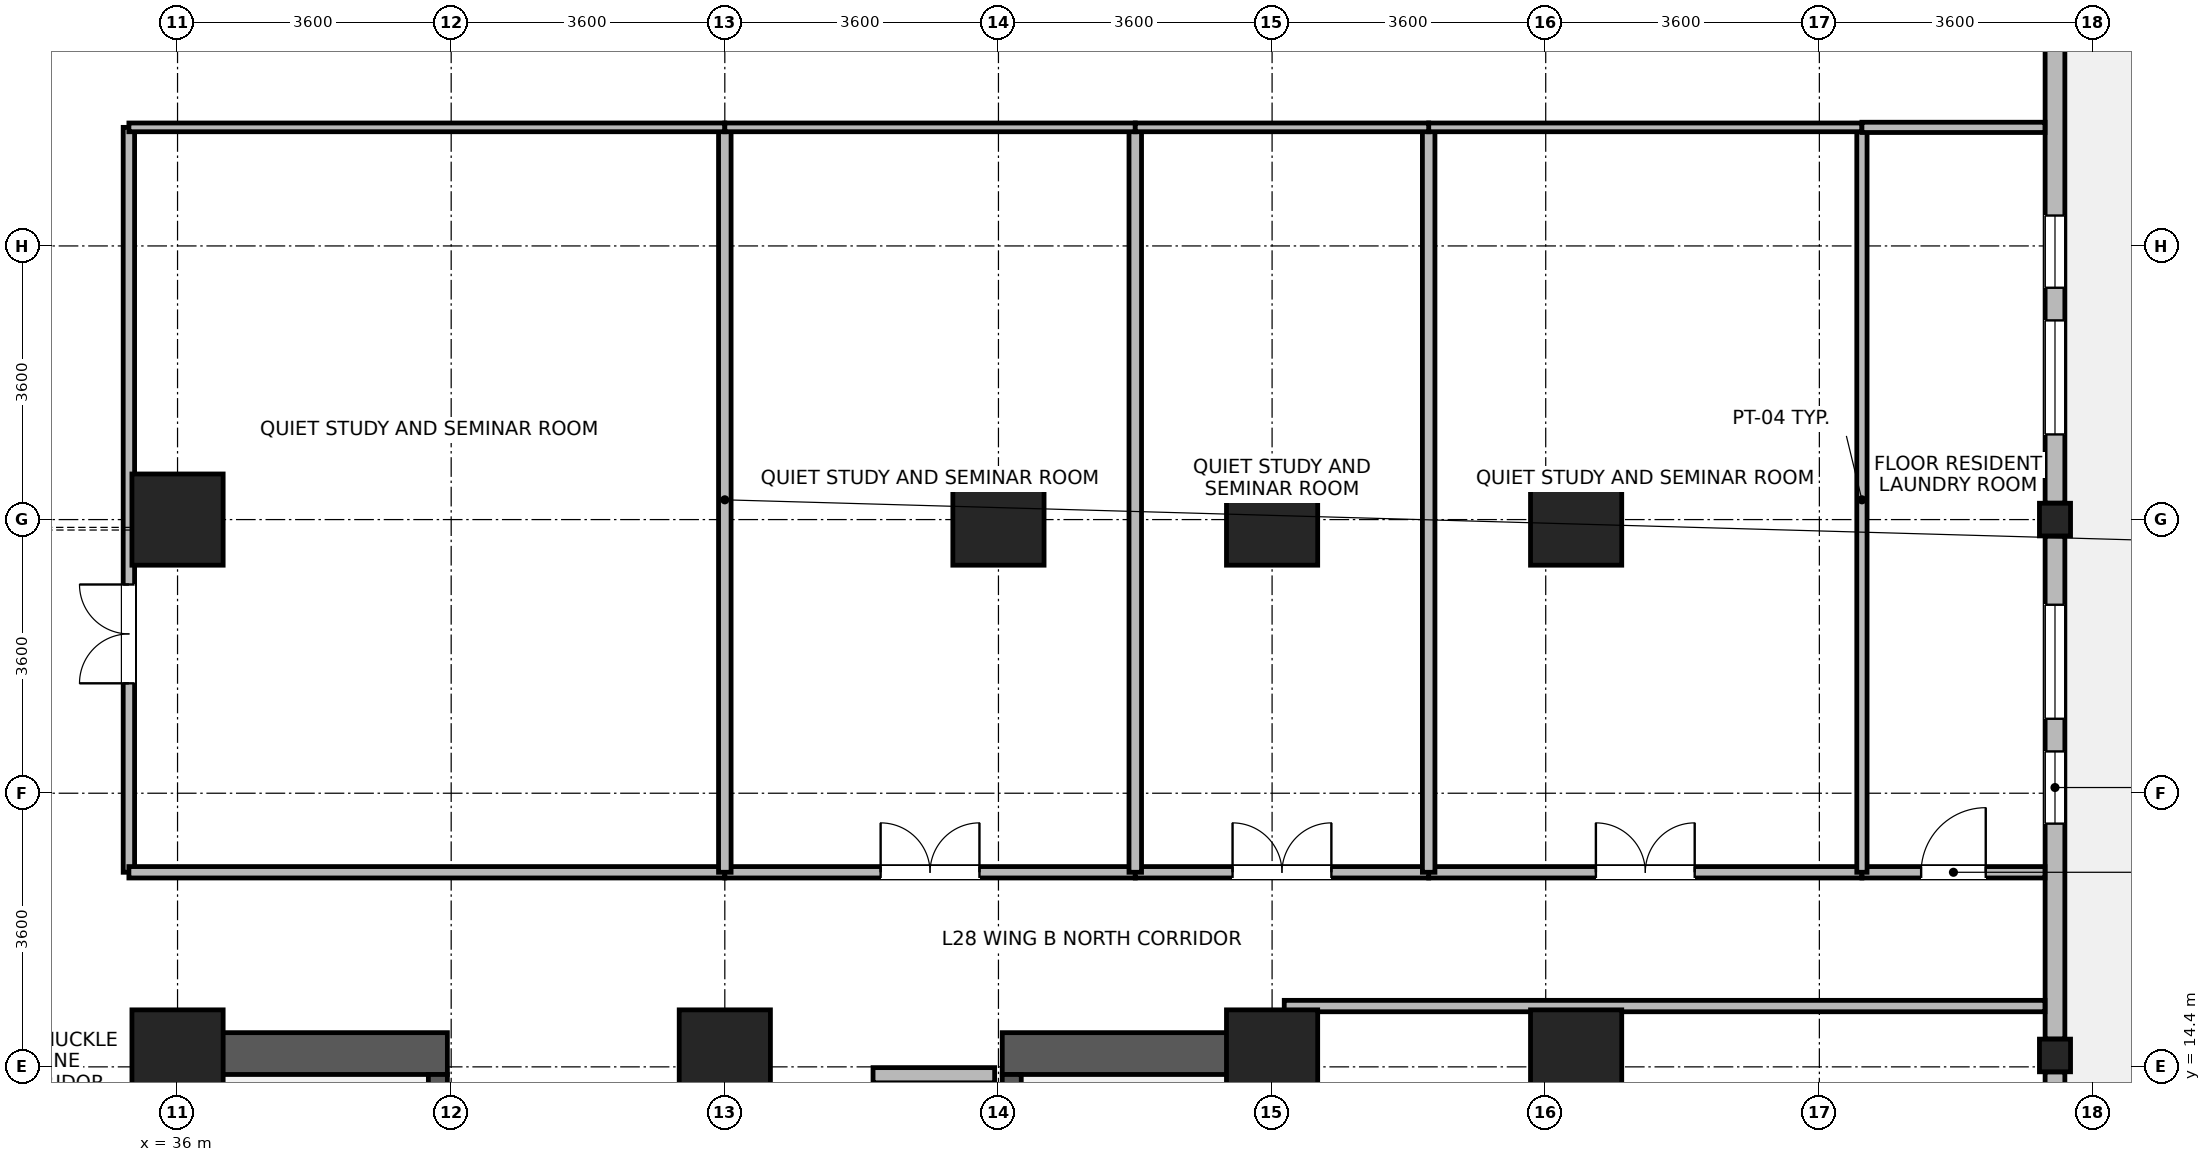
"""IFC4 building model, lengths in metres.
Left out: names, types, materials, properties, quantities, classifications, styles, units other than length and angle.
Written with IfcOpenShell. Run it as: python <this file> out.ifc"""

import sys

from ifc_helpers import new_model, si_unit, direction, frame, frame_2d, origin, origin_2d, place, context, subcontext, project, spatial, rectangle, i_section, extrude, source, transform, mapped, element, fill, save


model = new_model("IFC4")
c1 = context("Model", 3, precision=1e-05, world=origin(), true_north=direction((0.0, 1.0)))
c2 = subcontext(c1, "Body", "Model", "MODEL_VIEW")
j1 = project(units=[si_unit("LENGTHUNIT", "METRE"), si_unit("PLANEANGLEUNIT", "RADIAN")], contexts=[c1])
p1 = place(None, origin())
s1 = spatial("IfcSite", under=j1, at=p1, CompositionType="ELEMENT")
p2 = place(p1, origin())
s2 = spatial("IfcBuilding", under=s1, at=p2, CompositionType="ELEMENT")
p3 = place(p2, frame((0.0, 0.0, 111.9)))
s3 = spatial("IfcBuildingStorey", under=s2, at=p3, CompositionType="ELEMENT", Elevation=111.9)
for number, where, z_axis, x_axis in (
    (1, (36.075, 6.75, 0.0), (0.0, 0.0, 1.0), (0.0, 1.0, 0.0)),
    (2, (50.325, 6.75, 0.0), (0.0, 0.0, 1.0), (0.0, 1.0, 0.0)),
):
    element("IfcWall", number, at=place(p3, frame(where, z_axis=z_axis, x_axis=x_axis)), inside=s3, PredefinedType="SHEAR", context=c2, shape_type="SweptSolid", body=[
        extrude(rectangle(XDim=8.1, YDim=0.55, at=frame_2d((4.05, 0.0))), origin(), (0.0, 0.0, 1.0), 3.45),
    ])
for number, where, z_axis, x_axis in (
    (3, (36.35, 14.575, 0.0), (0.0, 0.0, 1.0), (1.0, 0.0, 0.0)),
    (4, (46.85, 14.575, 0.0), (0.0, 0.0, 1.0), (1.0, 0.0, 0.0)),
):
    element("IfcWall", number, at=place(p3, frame(where, z_axis=z_axis, x_axis=x_axis)), inside=s3, PredefinedType="SHEAR", context=c2, shape_type="SweptSolid", body=[
        extrude(rectangle(XDim=3.2, YDim=0.55, at=frame_2d((1.6, 0.0))), origin(), (0.0, 0.0, 1.0), 3.45),
    ])
p4 = place(p3, frame((39.425, 7.3, 0.0), z_axis=(0.0, 0.0, 1.0), x_axis=(0.0, 1.0, 0.0)))
e5 = element("IfcWall", 5, at=p4, inside=s3, PredefinedType="SHEAR", context=c2, shape_type="SweptSolid", body=[
    extrude(rectangle(XDim=7.0, YDim=0.25, at=frame_2d((3.5, 0.0))), origin(), (0.0, 0.0, 1.0), 3.45),
])
p5 = place(p4, frame((0.15, 0.0, 0.0)))
e6 = element("IfcOpeningElement", 6, at=p5, cuts=e5, PredefinedType="OPENING", context=c2, shape_type="SweptSolid", body=[
    extrude(rectangle(XDim=1.1, YDim=2.08, at=frame_2d((0.55, 1.04))), frame((0.0, 0.135, 0.0), z_axis=(0.0, -1.0, 0.0), x_axis=(1.0, 0.0, 0.0)), (0.0, 0.0, 1.0), 0.27),
])
p6 = place(p3, frame((46.975, 7.3, 0.0), z_axis=(0.0, 0.0, 1.0), x_axis=(0.0, 1.0, 0.0)))
e7 = element("IfcWall", 7, at=p6, inside=s3, PredefinedType="SHEAR", context=c2, shape_type="SweptSolid", body=[
    extrude(rectangle(XDim=7.0, YDim=0.25, at=frame_2d((3.5, 0.0))), origin(), (0.0, 0.0, 1.0), 3.45),
])
p7 = place(p6, frame((0.15, 0.0, 0.0)))
e8 = element("IfcOpeningElement", 8, at=p7, cuts=e7, PredefinedType="OPENING", context=c2, shape_type="SweptSolid", body=[
    extrude(rectangle(XDim=1.1, YDim=2.08, at=frame_2d((0.55, 1.04))), frame((0.0, 0.135, 0.0), z_axis=(0.0, -1.0, 0.0), x_axis=(1.0, 0.0, 0.0)), (0.0, 0.0, 1.0), 0.27),
])
m1 = source(origin(), c2, "Body", "SweptSolid", [
    extrude(rectangle(XDim=1.2, YDim=1.2, at=origin_2d()), origin(), (0.0, 0.0, 1.0), 3.7),
])
for number, where, z_axis, x_axis in (
    (9, (36.0, 21.6, 0.0), (0.0, 0.0, 1.0), (1.0, 0.0, 0.0)),
    (10, (46.8, 21.6, 0.0), (0.0, 0.0, 1.0), (1.0, 0.0, 0.0)),
    (11, (36.0, 14.55, 0.0), (0.0, 0.0, 1.0), (1.0, 0.0, 0.0)),
    (12, (43.2, 14.55, 0.0), (0.0, 0.0, 1.0), (1.0, 0.0, 0.0)),
    (13, (50.4, 14.55, 0.0), (0.0, 0.0, 1.0), (1.0, 0.0, 0.0)),
    (14, (50.4, 21.6, 0.0), (0.0, 0.0, 1.0), (1.0, 0.0, 0.0)),
    (15, (54.4, 14.55, 0.0), (0.0, 0.0, 1.0), (1.0, 0.0, 0.0)),
    (16, (54.4, 21.6, 0.0), (0.0, 0.0, 1.0), (1.0, 0.0, 0.0)),
):
    element("IfcColumn", number, at=place(p3, frame(where, z_axis=z_axis, x_axis=x_axis)), inside=s3, PredefinedType="COLUMN", context=c2, shape_type="MappedRepresentation", body=[
        mapped(m1, transform((0.0, 0.0, 0.0), x_axis=(1.0, 0.0, 0.0), y_axis=(0.0, 1.0, 0.0), z_axis=(0.0, 0.0, 1.0), scale=1.0)),
    ])
m2 = source(origin(), c2, "Body", "SweptSolid", [
    extrude(i_section(OverallWidth=0.409, OverallDepth=0.43, WebThickness=0.024, FlangeThickness=0.033, FilletRadius=0.015, at=origin_2d()), origin(), (0.0, 0.0, 1.0), 3.7),
])
for number, where, z_axis, x_axis in (
    (17, (60.7, 14.55, 0.0), (0.0, 0.0, 1.0), (1.0, 0.0, 0.0)),
    (18, (60.7, 21.6, 0.0), (0.0, 0.0, 1.0), (1.0, 0.0, 0.0)),
):
    element("IfcColumn", number, at=place(p3, frame(where, z_axis=z_axis, x_axis=x_axis)), inside=s3, PredefinedType="COLUMN", context=c2, shape_type="MappedRepresentation", body=[
        mapped(m2, transform((0.0, 0.0, 0.0), x_axis=(1.0, 0.0, 0.0), y_axis=(0.0, 1.0, 0.0), z_axis=(0.0, 0.0, 1.0), scale=1.0)),
    ])
p8 = place(p3, frame((60.7, 14.334, 0.0), z_axis=(0.0, 0.0, 1.0), x_axis=(0.0, -1.0, 0.0)))
e19 = element("IfcWall", 19, at=p8, inside=s3, PredefinedType="STANDARD", context=c2, shape_type="SweptSolid", body=[
    extrude(rectangle(XDim=7.068, YDim=0.26, at=frame_2d((3.534, 0.0))), origin(), (0.0, 0.0, 1.0), 2.98),
])
p9 = place(p8, frame((2.784, 0.0, 0.0)))
e20 = element("IfcOpeningElement", 20, at=p9, cuts=e19, PredefinedType="OPENING", context=c2, shape_type="SweptSolid", body=[
    extrude(rectangle(XDim=1.5, YDim=2.15, at=frame_2d((0.75, 1.075))), frame((0.0, 0.14, 0.0), z_axis=(0.0, -1.0, 0.0), x_axis=(1.0, 0.0, 0.0)), (0.0, 0.0, 1.0), 0.28),
])
p10 = place(p8, frame((1.017, 0.0, 0.85)))
e21 = element("IfcOpeningElement", 21, at=p10, cuts=e19, PredefinedType="OPENING", context=c2, shape_type="SweptSolid", body=[
    extrude(rectangle(XDim=1.5, YDim=1.85, at=frame_2d((0.75, 0.925))), frame((0.0, 0.14, 0.0), z_axis=(0.0, -1.0, 0.0), x_axis=(1.0, 0.0, 0.0)), (0.0, 0.0, 1.0), 0.28),
])
p11 = place(p8, frame((4.551, 0.0, 0.85)))
e22 = element("IfcOpeningElement", 22, at=p11, cuts=e19, PredefinedType="OPENING", context=c2, shape_type="SweptSolid", body=[
    extrude(rectangle(XDim=1.5, YDim=1.85, at=frame_2d((0.75, 0.925))), frame((0.0, 0.14, 0.0), z_axis=(0.0, -1.0, 0.0), x_axis=(1.0, 0.0, 0.0)), (0.0, 0.0, 1.0), 0.28),
])
p12 = place(p3, frame((60.7, 21.384, 0.0), z_axis=(0.0, 0.0, 1.0), x_axis=(0.0, -1.0, 0.0)))
e23 = element("IfcWall", 23, at=p12, inside=s3, PredefinedType="STANDARD", context=c2, shape_type="SweptSolid", body=[
    extrude(rectangle(XDim=6.618, YDim=0.26, at=frame_2d((3.309, 0.0))), origin(), (0.0, 0.0, 1.0), 2.98),
])
p13 = place(p12, frame((0.905, 0.0, 0.85)))
e24 = element("IfcOpeningElement", 24, at=p13, cuts=e23, PredefinedType="OPENING", context=c2, shape_type="SweptSolid", body=[
    extrude(rectangle(XDim=1.5, YDim=1.85, at=frame_2d((0.75, 0.925))), frame((0.0, 0.14, 0.0), z_axis=(0.0, -1.0, 0.0), x_axis=(1.0, 0.0, 0.0)), (0.0, 0.0, 1.0), 0.28),
])
p14 = place(p12, frame((2.834, 0.0, 0.85)))
e25 = element("IfcOpeningElement", 25, at=p14, cuts=e23, PredefinedType="OPENING", context=c2, shape_type="SweptSolid", body=[
    extrude(rectangle(XDim=0.95, YDim=1.75, at=frame_2d((0.475, 0.875))), frame((0.0, 0.14, 0.0), z_axis=(0.0, -1.0, 0.0), x_axis=(1.0, 0.0, 0.0)), (0.0, 0.0, 1.0), 0.28),
])
p15 = place(p3, frame((60.7, 28.434, 0.0), z_axis=(0.0, 0.0, 1.0), x_axis=(0.0, -1.0, 0.0)))
e26 = element("IfcWall", 26, at=p15, inside=s3, PredefinedType="STANDARD", context=c2, shape_type="SweptSolid", body=[
    extrude(rectangle(XDim=6.618, YDim=0.26, at=frame_2d((3.309, 0.0))), origin(), (0.0, 0.0, 1.0), 2.98),
])
p16 = place(p15, frame((4.213, 0.0, 0.85)))
e27 = element("IfcOpeningElement", 27, at=p16, cuts=e26, PredefinedType="OPENING", context=c2, shape_type="SweptSolid", body=[
    extrude(rectangle(XDim=1.5, YDim=1.85, at=frame_2d((0.75, 0.925))), frame((0.0, 0.14, 0.0), z_axis=(0.0, -1.0, 0.0), x_axis=(1.0, 0.0, 0.0)), (0.0, 0.0, 1.0), 0.28),
])
p17 = place(p15, frame((2.834, 0.0, 0.85)))
e28 = element("IfcOpeningElement", 28, at=p17, cuts=e26, PredefinedType="OPENING", context=c2, shape_type="SweptSolid", body=[
    extrude(rectangle(XDim=0.95, YDim=1.75, at=frame_2d((0.475, 0.875))), frame((0.0, 0.14, 0.0), z_axis=(0.0, -1.0, 0.0), x_axis=(1.0, 0.0, 0.0)), (0.0, 0.0, 1.0), 0.28),
])
p18 = place(p3, frame((45.15, 14.29, 0.0), z_axis=(0.0, 0.0, 1.0), x_axis=(1.0, 0.0, 0.0)))
e29 = element("IfcWall", 29, at=p18, inside=s3, PredefinedType="PARTITIONING", context=c2, shape_type="SweptSolid", body=[
    extrude(rectangle(XDim=1.6, YDim=0.2, at=frame_2d((0.8, 0.0))), origin(), (0.0, 0.0, 1.0), 2.43),
])
p19 = place(p3, frame((50.56, 15.2, 0.0), z_axis=(0.0, 0.0, 1.0), x_axis=(1.0, 0.0, 0.0)))
e30 = element("IfcWall", 30, at=p19, inside=s3, PredefinedType="PARTITIONING", context=c2, shape_type="SweptSolid", body=[
    extrude(rectangle(XDim=10.008, YDim=0.15, at=frame_2d((5.004, 0.0))), origin(), (0.0, 0.0, 1.0), 3.43),
])
p20 = place(p3, frame((35.36, 16.96, 0.0), z_axis=(0.0, 0.0, 1.0), x_axis=(0.0, 1.0, 0.0)))
e31 = element("IfcWall", 31, at=p20, inside=s3, PredefinedType="PARTITIONING", context=c2, shape_type="SweptSolid", body=[
    extrude(rectangle(XDim=9.8, YDim=0.15, at=frame_2d((4.9, 0.0))), origin(), (0.0, 0.0, 1.0), 3.43),
])
p21 = place(p20, frame((2.486, 0.0, 0.0)))
e32 = element("IfcOpeningElement", 32, at=p21, cuts=e31, PredefinedType="OPENING", context=c2, shape_type="SweptSolid", body=[
    extrude(rectangle(XDim=1.3, YDim=2.12, at=frame_2d((0.65, 1.06))), frame((0.0, 0.085, 0.0), z_axis=(0.0, -1.0, 0.0), x_axis=(1.0, 0.0, 0.0)), (0.0, 0.0, 1.0), 0.17),
])
p22 = place(p3, frame((35.36, 16.96, 0.0), z_axis=(0.0, 0.0, 1.0), x_axis=(1.0, 0.0, 0.0)))
e33 = element("IfcWall", 33, at=p22, inside=s3, PredefinedType="PARTITIONING", context=c2, shape_type="SweptSolid", body=[
    extrude(rectangle(XDim=7.84, YDim=0.15, at=frame_2d((3.92, 0.0))), origin(), (0.0, 0.0, 1.0), 3.43),
])
p23 = place(p3, frame((52.46, 16.96, 0.0), z_axis=(0.0, 0.0, 1.0), x_axis=(1.0, 0.0, 0.0)))
e34 = element("IfcWall", 34, at=p23, inside=s3, PredefinedType="PARTITIONING", context=c2, shape_type="SweptSolid", body=[
    extrude(rectangle(XDim=5.7, YDim=0.15, at=frame_2d((2.85, 0.0))), origin(), (0.0, 0.0, 1.0), 3.43),
])
p24 = place(p23, frame((2.2, 0.0, 0.0)))
e35 = element("IfcOpeningElement", 35, at=p24, cuts=e34, PredefinedType="OPENING", context=c2, shape_type="SweptSolid", body=[
    extrude(rectangle(XDim=1.3, YDim=2.12, at=frame_2d((0.65, 1.06))), frame((0.0, 0.085, 0.0), z_axis=(0.0, -1.0, 0.0), x_axis=(1.0, 0.0, 0.0)), (0.0, 0.0, 1.0), 0.17),
])
p25 = place(p3, frame((43.2, 16.96, 0.0), z_axis=(0.0, 0.0, 1.0), x_axis=(1.0, 0.0, 0.0)))
e36 = element("IfcWall", 36, at=p25, inside=s3, PredefinedType="PARTITIONING", context=c2, shape_type="SweptSolid", body=[
    extrude(rectangle(XDim=5.4, YDim=0.15, at=frame_2d((2.7, 0.0))), origin(), (0.0, 0.0, 1.0), 3.43),
])
p26 = place(p25, frame((2.05, 0.0, 0.0)))
e37 = element("IfcOpeningElement", 37, at=p26, cuts=e36, PredefinedType="OPENING", context=c2, shape_type="SweptSolid", body=[
    extrude(rectangle(XDim=1.3, YDim=2.12, at=frame_2d((0.65, 1.06))), frame((0.0, 0.085, 0.0), z_axis=(0.0, -1.0, 0.0), x_axis=(1.0, 0.0, 0.0)), (0.0, 0.0, 1.0), 0.17),
])
p27 = place(p3, frame((48.6, 16.96, 0.0), z_axis=(0.0, 0.0, 1.0), x_axis=(1.0, 0.0, 0.0)))
e38 = element("IfcWall", 38, at=p27, inside=s3, PredefinedType="PARTITIONING", context=c2, shape_type="SweptSolid", body=[
    extrude(rectangle(XDim=3.86, YDim=0.15, at=frame_2d((1.93, 0.0))), origin(), (0.0, 0.0, 1.0), 3.43),
])
p28 = place(p27, frame((1.28, 0.0, 0.0)))
e39 = element("IfcOpeningElement", 39, at=p28, cuts=e38, PredefinedType="OPENING", context=c2, shape_type="SweptSolid", body=[
    extrude(rectangle(XDim=1.3, YDim=2.12, at=frame_2d((0.65, 1.06))), frame((0.0, 0.085, 0.0), z_axis=(0.0, -1.0, 0.0), x_axis=(1.0, 0.0, 0.0)), (0.0, 0.0, 1.0), 0.17),
])
p29 = place(p3, frame((58.16, 16.96, 0.0), z_axis=(0.0, 0.0, 1.0), x_axis=(1.0, 0.0, 0.0)))
e40 = element("IfcWall", 40, at=p29, inside=s3, PredefinedType="PARTITIONING", context=c2, shape_type="SweptSolid", body=[
    extrude(rectangle(XDim=2.408, YDim=0.15, at=frame_2d((1.204, 0.0))), origin(), (0.0, 0.0, 1.0), 3.43),
])
p30 = place(p29, frame((0.779, 0.0, 0.0)))
e41 = element("IfcOpeningElement", 41, at=p30, cuts=e40, PredefinedType="OPENING", context=c2, shape_type="SweptSolid", body=[
    extrude(rectangle(XDim=0.85, YDim=2.04, at=frame_2d((0.425, 1.02))), frame((0.0, 0.085, 0.0), z_axis=(0.0, -1.0, 0.0), x_axis=(1.0, 0.0, 0.0)), (0.0, 0.0, 1.0), 0.17),
])
for number, where, z_axis, x_axis in (
    (42, (43.2, 16.96, 0.0), (0.0, 0.0, 1.0), (0.0, 1.0, 0.0)),
    (43, (48.6, 16.96, 0.0), (0.0, 0.0, 1.0), (0.0, 1.0, 0.0)),
    (44, (52.46, 16.96, 0.0), (0.0, 0.0, 1.0), (0.0, 1.0, 0.0)),
):
    element("IfcWall", number, at=place(p3, frame(where, z_axis=z_axis, x_axis=x_axis)), inside=s3, PredefinedType="PARTITIONING", context=c2, shape_type="SweptSolid", body=[
        extrude(rectangle(XDim=9.8, YDim=0.165, at=frame_2d((4.9, 0.0))), origin(), (0.0, 0.0, 1.0), 3.43),
    ])
p31 = place(p3, frame((58.16, 16.96, 0.0), z_axis=(0.0, 0.0, 1.0), x_axis=(0.0, 1.0, 0.0)))
e45 = element("IfcWall", 45, at=p31, inside=s3, PredefinedType="PARTITIONING", context=c2, shape_type="SweptSolid", body=[
    extrude(rectangle(XDim=9.8, YDim=0.135, at=frame_2d((4.9, 0.0))), origin(), (0.0, 0.0, 1.0), 3.43),
])
p32 = place(p3, frame((35.36, 26.76, 0.0), z_axis=(0.0, 0.0, 1.0), x_axis=(1.0, 0.0, 0.0)))
e46 = element("IfcWall", 46, at=p32, inside=s3, PredefinedType="PARTITIONING", context=c2, shape_type="SweptSolid", body=[
    extrude(rectangle(XDim=7.84, YDim=0.115, at=frame_2d((3.92, 0.0))), origin(), (0.0, 0.0, 1.0), 3.43),
])
p33 = place(p3, frame((52.46, 26.76, 0.0), z_axis=(0.0, 0.0, 1.0), x_axis=(1.0, 0.0, 0.0)))
e47 = element("IfcWall", 47, at=p33, inside=s3, PredefinedType="PARTITIONING", context=c2, shape_type="SweptSolid", body=[
    extrude(rectangle(XDim=5.7, YDim=0.115, at=frame_2d((2.85, 0.0))), origin(), (0.0, 0.0, 1.0), 3.43),
])
p34 = place(p3, frame((43.2, 26.76, 0.0), z_axis=(0.0, 0.0, 1.0), x_axis=(1.0, 0.0, 0.0)))
e48 = element("IfcWall", 48, at=p34, inside=s3, PredefinedType="PARTITIONING", context=c2, shape_type="SweptSolid", body=[
    extrude(rectangle(XDim=5.4, YDim=0.115, at=frame_2d((2.7, 0.0))), origin(), (0.0, 0.0, 1.0), 3.43),
])
p35 = place(p3, frame((48.6, 26.76, 0.0), z_axis=(0.0, 0.0, 1.0), x_axis=(1.0, 0.0, 0.0)))
e49 = element("IfcWall", 49, at=p35, inside=s3, PredefinedType="PARTITIONING", context=c2, shape_type="SweptSolid", body=[
    extrude(rectangle(XDim=3.86, YDim=0.115, at=frame_2d((1.93, 0.0))), origin(), (0.0, 0.0, 1.0), 3.43),
])
p36 = place(p3, frame((58.16, 26.76, 0.0), z_axis=(0.0, 0.0, 1.0), x_axis=(1.0, 0.0, 0.0)))
e50 = element("IfcWall", 50, at=p36, inside=s3, PredefinedType="PARTITIONING", context=c2, shape_type="SweptSolid", body=[
    extrude(rectangle(XDim=2.408, YDim=0.135, at=frame_2d((1.204, 0.0))), origin(), (0.0, 0.0, 1.0), 3.43),
])
p37 = place(p13, origin())
e51 = element("IfcWindow", 51, at=p37, inside=s3, PartitioningType="SINGLE_PANEL", PredefinedType="WINDOW", context=c2, shape_type="SweptSolid", body=[
    extrude(rectangle(XDim=1.5, YDim=1.85, at=frame_2d((0.75, 0.925))), frame((0.0, 0.03, 0.0), z_axis=(0.0, -1.0, 0.0), x_axis=(1.0, 0.0, 0.0)), (0.0, 0.0, 1.0), 0.06),
])
fill(e24, e51)
p38 = place(p14, origin())
e52 = element("IfcWindow", 52, at=p38, inside=s3, PartitioningType="SINGLE_PANEL", PredefinedType="WINDOW", context=c2, shape_type="SweptSolid", body=[
    extrude(rectangle(XDim=0.95, YDim=1.75, at=frame_2d((0.475, 0.875))), frame((0.0, 0.03, 0.0), z_axis=(0.0, -1.0, 0.0), x_axis=(1.0, 0.0, 0.0)), (0.0, 0.0, 1.0), 0.06),
])
fill(e25, e52)
p39 = place(p16, origin())
e53 = element("IfcWindow", 53, at=p39, inside=s3, PartitioningType="SINGLE_PANEL", PredefinedType="WINDOW", context=c2, shape_type="SweptSolid", body=[
    extrude(rectangle(XDim=1.5, YDim=1.85, at=frame_2d((0.75, 0.925))), frame((0.0, 0.03, 0.0), z_axis=(0.0, -1.0, 0.0), x_axis=(1.0, 0.0, 0.0)), (0.0, 0.0, 1.0), 0.06),
])
fill(e27, e53)
p40 = place(p17, origin())
e54 = element("IfcWindow", 54, at=p40, inside=s3, PartitioningType="SINGLE_PANEL", PredefinedType="WINDOW", context=c2, shape_type="SweptSolid", body=[
    extrude(rectangle(XDim=0.95, YDim=1.75, at=frame_2d((0.475, 0.875))), frame((0.0, 0.03, 0.0), z_axis=(0.0, -1.0, 0.0), x_axis=(1.0, 0.0, 0.0)), (0.0, 0.0, 1.0), 0.06),
])
fill(e28, e54)
p41 = place(p21, origin())
e55 = element("IfcDoor", 55, at=p41, inside=s3, OperationType="DOUBLE_DOOR_SINGLE_SWING", PredefinedType="DOOR", context=c2, shape_type="SweptSolid", body=[
    extrude(rectangle(XDim=1.3, YDim=2.12, at=frame_2d((0.65, 1.06))), frame((0.0, 0.025, 0.0), z_axis=(0.0, -1.0, 0.0), x_axis=(1.0, 0.0, 0.0)), (0.0, 0.0, 1.0), 0.05),
])
fill(e32, e55)
p42 = place(p24, origin())
e56 = element("IfcDoor", 56, at=p42, inside=s3, OperationType="DOUBLE_DOOR_SINGLE_SWING", PredefinedType="DOOR", context=c2, shape_type="SweptSolid", body=[
    extrude(rectangle(XDim=1.3, YDim=2.12, at=frame_2d((0.65, 1.06))), frame((0.0, 0.025, 0.0), z_axis=(0.0, -1.0, 0.0), x_axis=(1.0, 0.0, 0.0)), (0.0, 0.0, 1.0), 0.05),
])
fill(e35, e56)
p43 = place(p26, origin())
e57 = element("IfcDoor", 57, at=p43, inside=s3, OperationType="DOUBLE_DOOR_SINGLE_SWING", PredefinedType="DOOR", context=c2, shape_type="SweptSolid", body=[
    extrude(rectangle(XDim=1.3, YDim=2.12, at=frame_2d((0.65, 1.06))), frame((0.0, 0.025, 0.0), z_axis=(0.0, -1.0, 0.0), x_axis=(1.0, 0.0, 0.0)), (0.0, 0.0, 1.0), 0.05),
])
fill(e37, e57)
p44 = place(p28, origin())
e58 = element("IfcDoor", 58, at=p44, inside=s3, OperationType="DOUBLE_DOOR_SINGLE_SWING", PredefinedType="DOOR", context=c2, shape_type="SweptSolid", body=[
    extrude(rectangle(XDim=1.3, YDim=2.12, at=frame_2d((0.65, 1.06))), frame((0.0, 0.025, 0.0), z_axis=(0.0, -1.0, 0.0), x_axis=(1.0, 0.0, 0.0)), (0.0, 0.0, 1.0), 0.05),
])
fill(e39, e58)
p45 = place(p30, origin())
e59 = element("IfcDoor", 59, at=p45, inside=s3, OperationType="SINGLE_SWING_RIGHT", PredefinedType="DOOR", context=c2, shape_type="SweptSolid", body=[
    extrude(rectangle(XDim=0.85, YDim=2.04, at=frame_2d((0.425, 1.02))), frame((0.0, 0.025, 0.0), z_axis=(0.0, -1.0, 0.0), x_axis=(1.0, 0.0, 0.0)), (0.0, 0.0, 1.0), 0.05),
])
fill(e41, e59)
save(model, sys.argv[1])
